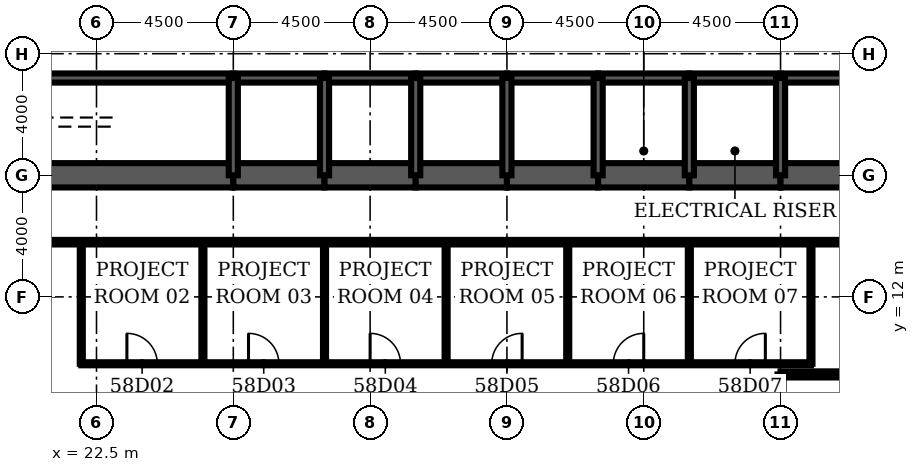
"""IFC4 building model, lengths in metres.
Left out: names, types, materials, properties, quantities, classifications, styles, units other than length and angle.
Written with IfcOpenShell. Run it as: python <this file> out.ifc"""

import sys

from ifc_helpers import new_model, si_unit, direction, frame, frame_2d, origin, place, context, subcontext, project, spatial, rectangle, extrude, element, fill, save


model = new_model("IFC4")
c1 = context("Model", 3, precision=1e-05, world=origin(), true_north=direction((0.0, 1.0)))
c2 = subcontext(c1, "Body", "Model", "MODEL_VIEW")
j1 = project(units=[si_unit("LENGTHUNIT", "METRE"), si_unit("PLANEANGLEUNIT", "RADIAN")], contexts=[c1])
p1 = place(None, origin())
s1 = spatial("IfcSite", under=j1, at=p1, CompositionType="ELEMENT")
p2 = place(p1, origin())
s2 = spatial("IfcBuilding", under=s1, at=p2, CompositionType="ELEMENT")
p3 = place(p2, frame((0.0, 0.0, 257.2)))
s3 = spatial("IfcBuildingStorey", under=s2, at=p3, CompositionType="ELEMENT", Elevation=257.2)
p4 = place(p3, frame((17.6, 16.0, 0.0), z_axis=(0.0, 0.0, 1.0), x_axis=(1.0, 0.0, 0.0)))
e1 = element("IfcWall", 1, at=p4, inside=s3, PredefinedType="SHEAR", context=c2, shape_type="SweptSolid", body=[
    extrude(rectangle(XDim=9.4, YDim=0.8, at=frame_2d((4.7, 0.0))), origin(), (0.0, 0.0, 1.0), 4.2),
])
for number, where, z_axis, x_axis in (
    (2, (27.0, 16.0, 0.0), (0.0, 0.0, 1.0), (1.0, 0.0, 0.0)),
    (3, (30.0, 16.0, 0.0), (0.0, 0.0, 1.0), (1.0, 0.0, 0.0)),
    (4, (33.0, 16.0, 0.0), (0.0, 0.0, 1.0), (1.0, 0.0, 0.0)),
    (5, (36.0, 16.0, 0.0), (0.0, 0.0, 1.0), (1.0, 0.0, 0.0)),
    (6, (39.0, 16.0, 0.0), (0.0, 0.0, 1.0), (1.0, 0.0, 0.0)),
    (7, (42.0, 16.0, 0.0), (0.0, 0.0, 1.0), (1.0, 0.0, 0.0)),
):
    element("IfcWall", number, at=place(p3, frame(where, z_axis=z_axis, x_axis=x_axis)), inside=s3, PredefinedType="SHEAR", context=c2, shape_type="SweptSolid", body=[
        extrude(rectangle(XDim=3.0, YDim=0.8, at=frame_2d((1.5, 0.0))), origin(), (0.0, 0.0, 1.0), 4.2),
    ])
p5 = place(p3, frame((45.0, 16.0, 0.0), z_axis=(0.0, 0.0, 1.0), x_axis=(1.0, 0.0, 0.0)))
e8 = element("IfcWall", 8, at=p5, inside=s3, PredefinedType="SHEAR", context=c2, shape_type="SweptSolid", body=[
    extrude(rectangle(XDim=9.4, YDim=0.8, at=frame_2d((4.7, 0.0))), origin(), (0.0, 0.0, 1.0), 4.2),
])
p6 = place(p3, frame((18.0, 19.2, 0.0), z_axis=(0.0, 0.0, 1.0), x_axis=(1.0, 0.0, 0.0)))
e9 = element("IfcWall", 9, at=p6, inside=s3, PredefinedType="SOLIDWALL", context=c2, shape_type="SweptSolid", body=[
    extrude(rectangle(XDim=9.0, YDim=0.3, at=frame_2d((4.5, 0.0))), origin(), (0.0, 0.0, 1.0), 4.2),
])
p7 = place(p6, frame((0.65, 0.0, 0.0)))
e10 = element("IfcOpeningElement", 10, at=p7, cuts=e9, PredefinedType="OPENING", context=c2, shape_type="SweptSolid", body=[
    extrude(rectangle(XDim=1.0, YDim=2.1, at=frame_2d((0.5, 1.05))), frame((0.0, 0.16, 0.0), z_axis=(0.0, -1.0, 0.0), x_axis=(1.0, 0.0, 0.0)), (0.0, 0.0, 1.0), 0.32),
])
p8 = place(p3, frame((27.0, 19.2, 0.0), z_axis=(0.0, 0.0, 1.0), x_axis=(1.0, 0.0, 0.0)))
e11 = element("IfcWall", 11, at=p8, inside=s3, PredefinedType="SOLIDWALL", context=c2, shape_type="SweptSolid", body=[
    extrude(rectangle(XDim=3.0, YDim=0.3, at=frame_2d((1.5, 0.0))), origin(), (0.0, 0.0, 1.0), 4.2),
])
p9 = place(p8, frame((0.95, 0.0, 0.0)))
e12 = element("IfcOpeningElement", 12, at=p9, cuts=e11, PredefinedType="OPENING", context=c2, shape_type="SweptSolid", body=[
    extrude(rectangle(XDim=1.1, YDim=2.2, at=frame_2d((0.55, 1.1))), frame((0.0, 0.16, 0.0), z_axis=(0.0, -1.0, 0.0), x_axis=(1.0, 0.0, 0.0)), (0.0, 0.0, 1.0), 0.32),
])
p10 = place(p3, frame((30.0, 19.2, 0.0), z_axis=(0.0, 0.0, 1.0), x_axis=(1.0, 0.0, 0.0)))
e13 = element("IfcWall", 13, at=p10, inside=s3, PredefinedType="SOLIDWALL", context=c2, shape_type="SweptSolid", body=[
    extrude(rectangle(XDim=3.0, YDim=0.3, at=frame_2d((1.5, 0.0))), origin(), (0.0, 0.0, 1.0), 4.2),
])
p11 = place(p10, frame((0.95, 0.0, 0.0)))
e14 = element("IfcOpeningElement", 14, at=p11, cuts=e13, PredefinedType="OPENING", context=c2, shape_type="SweptSolid", body=[
    extrude(rectangle(XDim=1.1, YDim=2.2, at=frame_2d((0.55, 1.1))), frame((0.0, 0.16, 0.0), z_axis=(0.0, -1.0, 0.0), x_axis=(1.0, 0.0, 0.0)), (0.0, 0.0, 1.0), 0.32),
])
p12 = place(p3, frame((33.0, 19.2, 0.0), z_axis=(0.0, 0.0, 1.0), x_axis=(1.0, 0.0, 0.0)))
e15 = element("IfcWall", 15, at=p12, inside=s3, PredefinedType="SOLIDWALL", context=c2, shape_type="SweptSolid", body=[
    extrude(rectangle(XDim=3.0, YDim=0.3, at=frame_2d((1.5, 0.0))), origin(), (0.0, 0.0, 1.0), 4.2),
])
p13 = place(p12, frame((0.95, 0.0, 0.0)))
e16 = element("IfcOpeningElement", 16, at=p13, cuts=e15, PredefinedType="OPENING", context=c2, shape_type="SweptSolid", body=[
    extrude(rectangle(XDim=1.1, YDim=2.2, at=frame_2d((0.55, 1.1))), frame((0.0, 0.16, 0.0), z_axis=(0.0, -1.0, 0.0), x_axis=(1.0, 0.0, 0.0)), (0.0, 0.0, 1.0), 0.32),
])
p14 = place(p3, frame((36.0, 19.2, 0.0), z_axis=(0.0, 0.0, 1.0), x_axis=(1.0, 0.0, 0.0)))
e17 = element("IfcWall", 17, at=p14, inside=s3, PredefinedType="SOLIDWALL", context=c2, shape_type="SweptSolid", body=[
    extrude(rectangle(XDim=3.0, YDim=0.3, at=frame_2d((1.5, 0.0))), origin(), (0.0, 0.0, 1.0), 4.2),
])
p15 = place(p14, frame((0.95, 0.0, 0.0)))
e18 = element("IfcOpeningElement", 18, at=p15, cuts=e17, PredefinedType="OPENING", context=c2, shape_type="SweptSolid", body=[
    extrude(rectangle(XDim=1.1, YDim=2.2, at=frame_2d((0.55, 1.1))), frame((0.0, 0.16, 0.0), z_axis=(0.0, -1.0, 0.0), x_axis=(1.0, 0.0, 0.0)), (0.0, 0.0, 1.0), 0.32),
])
p16 = place(p3, frame((39.0, 19.2, 0.0), z_axis=(0.0, 0.0, 1.0), x_axis=(1.0, 0.0, 0.0)))
e19 = element("IfcWall", 19, at=p16, inside=s3, PredefinedType="SOLIDWALL", context=c2, shape_type="SweptSolid", body=[
    extrude(rectangle(XDim=3.0, YDim=0.3, at=frame_2d((1.5, 0.0))), origin(), (0.0, 0.0, 1.0), 4.2),
])
p17 = place(p16, frame((1.0, 0.0, 0.0)))
e20 = element("IfcOpeningElement", 20, at=p17, cuts=e19, PredefinedType="OPENING", context=c2, shape_type="SweptSolid", body=[
    extrude(rectangle(XDim=1.0, YDim=2.1, at=frame_2d((0.5, 1.05))), frame((0.0, 0.16, 0.0), z_axis=(0.0, -1.0, 0.0), x_axis=(1.0, 0.0, 0.0)), (0.0, 0.0, 1.0), 0.32),
])
p18 = place(p3, frame((42.0, 19.2, 0.0), z_axis=(0.0, 0.0, 1.0), x_axis=(1.0, 0.0, 0.0)))
e21 = element("IfcWall", 21, at=p18, inside=s3, PredefinedType="SOLIDWALL", context=c2, shape_type="SweptSolid", body=[
    extrude(rectangle(XDim=3.0, YDim=0.3, at=frame_2d((1.5, 0.0))), origin(), (0.0, 0.0, 1.0), 4.2),
])
p19 = place(p18, frame((1.0, 0.0, 0.0)))
e22 = element("IfcOpeningElement", 22, at=p19, cuts=e21, PredefinedType="OPENING", context=c2, shape_type="SweptSolid", body=[
    extrude(rectangle(XDim=1.0, YDim=2.1, at=frame_2d((0.5, 1.05))), frame((0.0, 0.16, 0.0), z_axis=(0.0, -1.0, 0.0), x_axis=(1.0, 0.0, 0.0)), (0.0, 0.0, 1.0), 0.32),
])
p20 = place(p3, frame((45.0, 19.2, 0.0), z_axis=(0.0, 0.0, 1.0), x_axis=(1.0, 0.0, 0.0)))
e23 = element("IfcWall", 23, at=p20, inside=s3, PredefinedType="SOLIDWALL", context=c2, shape_type="SweptSolid", body=[
    extrude(rectangle(XDim=9.0, YDim=0.3, at=frame_2d((4.5, 0.0))), origin(), (0.0, 0.0, 1.0), 4.2),
])
p21 = place(p20, frame((7.35, 0.0, 0.0)))
e24 = element("IfcOpeningElement", 24, at=p21, cuts=e23, PredefinedType="OPENING", context=c2, shape_type="SweptSolid", body=[
    extrude(rectangle(XDim=1.0, YDim=2.1, at=frame_2d((0.5, 1.05))), frame((0.0, 0.16, 0.0), z_axis=(0.0, -1.0, 0.0), x_axis=(1.0, 0.0, 0.0)), (0.0, 0.0, 1.0), 0.32),
])
for number, where, z_axis, x_axis in (
    (25, (27.0, 16.0, 0.0), (0.0, 0.0, 1.0), (0.0, 1.0, 0.0)),
    (26, (30.0, 16.0, 0.0), (0.0, 0.0, 1.0), (0.0, 1.0, 0.0)),
    (27, (33.0, 16.0, 0.0), (0.0, 0.0, 1.0), (0.0, 1.0, 0.0)),
    (28, (36.0, 16.0, 0.0), (0.0, 0.0, 1.0), (0.0, 1.0, 0.0)),
    (29, (39.0, 16.0, 0.0), (0.0, 0.0, 1.0), (0.0, 1.0, 0.0)),
    (30, (42.0, 16.0, 0.0), (0.0, 0.0, 1.0), (0.0, 1.0, 0.0)),
    (31, (45.0, 16.0, 0.0), (0.0, 0.0, 1.0), (0.0, 1.0, 0.0)),
):
    element("IfcWall", number, at=place(p3, frame(where, z_axis=z_axis, x_axis=x_axis)), inside=s3, PredefinedType="SOLIDWALL", context=c2, shape_type="SweptSolid", body=[
        extrude(rectangle(XDim=3.2, YDim=0.3, at=frame_2d((1.6, 0.0))), origin(), (0.0, 0.0, 1.0), 4.2),
    ])
p22 = place(p3, frame((39.15, 17.35, 0.0), z_axis=(0.0, 0.0, 1.0), x_axis=(1.0, 0.0, 0.0)))
e32 = element("IfcWall", 32, at=p22, inside=s3, PredefinedType="SOLIDWALL", context=c2, shape_type="SweptSolid", body=[
    extrude(rectangle(XDim=2.7, YDim=0.3, at=frame_2d((1.35, 0.0))), origin(), (0.0, 0.0, 1.0), 4.04),
])
p23 = place(p22, frame((0.85, 0.0, 0.0)))
e33 = element("IfcOpeningElement", 33, at=p23, cuts=e32, PredefinedType="OPENING", context=c2, shape_type="SweptSolid", body=[
    extrude(rectangle(XDim=1.0, YDim=2.1, at=frame_2d((0.5, 1.05))), frame((0.0, 0.16, 0.0), z_axis=(0.0, -1.0, 0.0), x_axis=(1.0, 0.0, 0.0)), (0.0, 0.0, 1.0), 0.32),
])
p24 = place(p3, frame((42.15, 17.35, 0.0), z_axis=(0.0, 0.0, 1.0), x_axis=(1.0, 0.0, 0.0)))
e34 = element("IfcWall", 34, at=p24, inside=s3, PredefinedType="SOLIDWALL", context=c2, shape_type="SweptSolid", body=[
    extrude(rectangle(XDim=2.7, YDim=0.3, at=frame_2d((1.35, 0.0))), origin(), (0.0, 0.0, 1.0), 4.04),
])
p25 = place(p24, frame((0.85, 0.0, 0.0)))
e35 = element("IfcOpeningElement", 35, at=p25, cuts=e34, PredefinedType="OPENING", context=c2, shape_type="SweptSolid", body=[
    extrude(rectangle(XDim=1.0, YDim=2.1, at=frame_2d((0.5, 1.05))), frame((0.0, 0.16, 0.0), z_axis=(0.0, -1.0, 0.0), x_axis=(1.0, 0.0, 0.0)), (0.0, 0.0, 1.0), 0.32),
])
p26 = place(p3, frame((45.0, 9.45, 0.0), z_axis=(0.0, 0.0, 1.0), x_axis=(1.0, 0.0, 0.0)))
e36 = element("IfcWall", 36, at=p26, inside=s3, PredefinedType="PARTITIONING", context=c2, shape_type="SweptSolid", body=[
    extrude(rectangle(XDim=18.0, YDim=0.2, at=frame_2d((9.0, 0.0))), origin(), (0.0, 0.0, 1.0), 3.0),
])
p27 = place(p26, frame((8.2, 0.0, 0.0)))
e37 = element("IfcOpeningElement", 37, at=p27, cuts=e36, PredefinedType="OPENING", context=c2, shape_type="SweptSolid", body=[
    extrude(rectangle(XDim=1.6, YDim=2.1, at=frame_2d((0.8, 1.05))), frame((0.0, 0.11, 0.0), z_axis=(0.0, -1.0, 0.0), x_axis=(1.0, 0.0, 0.0)), (0.0, 0.0, 1.0), 0.22),
])
p28 = place(p3, frame((22.0, 9.8, 0.0), z_axis=(0.0, 0.0, 1.0), x_axis=(1.0, 0.0, 0.0)))
e38 = element("IfcWall", 38, at=p28, inside=s3, PredefinedType="PARTITIONING", context=c2, shape_type="SweptSolid", body=[
    extrude(rectangle(XDim=24.0, YDim=0.1, at=frame_2d((12.0, 0.0))), origin(), (0.0, 0.0, 1.0), 3.0),
])
p29 = place(p28, frame((1.5, 0.0, 0.0)))
e39 = element("IfcOpeningElement", 39, at=p29, cuts=e38, PredefinedType="OPENING", context=c2, shape_type="SweptSolid", body=[
    extrude(rectangle(XDim=1.0, YDim=2.1, at=frame_2d((0.5, 1.05))), frame((0.0, 0.06, 0.0), z_axis=(0.0, -1.0, 0.0), x_axis=(1.0, 0.0, 0.0)), (0.0, 0.0, 1.0), 0.12),
])
p30 = place(p28, frame((5.5, 0.0, 0.0)))
e40 = element("IfcOpeningElement", 40, at=p30, cuts=e38, PredefinedType="OPENING", context=c2, shape_type="SweptSolid", body=[
    extrude(rectangle(XDim=1.0, YDim=2.1, at=frame_2d((0.5, 1.05))), frame((0.0, 0.06, 0.0), z_axis=(0.0, -1.0, 0.0), x_axis=(1.0, 0.0, 0.0)), (0.0, 0.0, 1.0), 0.12),
])
p31 = place(p28, frame((9.5, 0.0, 0.0)))
e41 = element("IfcOpeningElement", 41, at=p31, cuts=e38, PredefinedType="OPENING", context=c2, shape_type="SweptSolid", body=[
    extrude(rectangle(XDim=1.0, YDim=2.1, at=frame_2d((0.5, 1.05))), frame((0.0, 0.06, 0.0), z_axis=(0.0, -1.0, 0.0), x_axis=(1.0, 0.0, 0.0)), (0.0, 0.0, 1.0), 0.12),
])
p32 = place(p28, frame((13.5, 0.0, 0.0)))
e42 = element("IfcOpeningElement", 42, at=p32, cuts=e38, PredefinedType="OPENING", context=c2, shape_type="SweptSolid", body=[
    extrude(rectangle(XDim=1.0, YDim=2.1, at=frame_2d((0.5, 1.05))), frame((0.0, 0.06, 0.0), z_axis=(0.0, -1.0, 0.0), x_axis=(1.0, 0.0, 0.0)), (0.0, 0.0, 1.0), 0.12),
])
p33 = place(p28, frame((17.5, 0.0, 0.0)))
e43 = element("IfcOpeningElement", 43, at=p33, cuts=e38, PredefinedType="OPENING", context=c2, shape_type="SweptSolid", body=[
    extrude(rectangle(XDim=1.0, YDim=2.1, at=frame_2d((0.5, 1.05))), frame((0.0, 0.06, 0.0), z_axis=(0.0, -1.0, 0.0), x_axis=(1.0, 0.0, 0.0)), (0.0, 0.0, 1.0), 0.12),
])
p34 = place(p28, frame((21.5, 0.0, 0.0)))
e44 = element("IfcOpeningElement", 44, at=p34, cuts=e38, PredefinedType="OPENING", context=c2, shape_type="SweptSolid", body=[
    extrude(rectangle(XDim=1.0, YDim=2.1, at=frame_2d((0.5, 1.05))), frame((0.0, 0.06, 0.0), z_axis=(0.0, -1.0, 0.0), x_axis=(1.0, 0.0, 0.0)), (0.0, 0.0, 1.0), 0.12),
])
p35 = place(p3, frame((15.2, 13.8, 0.0), z_axis=(0.0, 0.0, 1.0), x_axis=(1.0, 0.0, 0.0)))
e45 = element("IfcWall", 45, at=p35, inside=s3, PredefinedType="PARTITIONING", context=c2, shape_type="SweptSolid", body=[
    extrude(rectangle(XDim=41.6, YDim=0.15, at=frame_2d((20.8, 0.0))), origin(), (0.0, 0.0, 1.0), 3.0),
])
p36 = place(p35, frame((4.175, 0.0, 0.0)))
e46 = element("IfcOpeningElement", 46, at=p36, cuts=e45, PredefinedType="OPENING", context=c2, shape_type="SweptSolid", body=[
    extrude(rectangle(XDim=1.2, YDim=2.1, at=frame_2d((0.6, 1.05))), frame((0.0, 0.085, 0.0), z_axis=(0.0, -1.0, 0.0), x_axis=(1.0, 0.0, 0.0)), (0.0, 0.0, 1.0), 0.17),
])
for number, where, z_axis, x_axis in (
    (47, (22.0, 9.8, 0.0), (0.0, 0.0, 1.0), (0.0, 1.0, 0.0)),
    (48, (26.0, 9.8, 0.0), (0.0, 0.0, 1.0), (0.0, 1.0, 0.0)),
    (49, (30.0, 9.8, 0.0), (0.0, 0.0, 1.0), (0.0, 1.0, 0.0)),
    (50, (34.0, 9.8, 0.0), (0.0, 0.0, 1.0), (0.0, 1.0, 0.0)),
    (51, (38.0, 9.8, 0.0), (0.0, 0.0, 1.0), (0.0, 1.0, 0.0)),
    (52, (42.0, 9.8, 0.0), (0.0, 0.0, 1.0), (0.0, 1.0, 0.0)),
):
    element("IfcWall", number, at=place(p3, frame(where, z_axis=z_axis, x_axis=x_axis)), inside=s3, PredefinedType="PARTITIONING", context=c2, shape_type="SweptSolid", body=[
        extrude(rectangle(XDim=4.0, YDim=0.1, at=frame_2d((2.0, 0.0))), origin(), (0.0, 0.0, 1.0), 3.0),
    ])
p37 = place(p3, frame((45.0, 2.45, 0.0), z_axis=(0.0, 0.0, 1.0), x_axis=(0.0, 1.0, 0.0)))
e53 = element("IfcWall", 53, at=p37, inside=s3, PredefinedType="PARTITIONING", context=c2, shape_type="SweptSolid", body=[
    extrude(rectangle(XDim=7.0, YDim=0.2, at=frame_2d((3.5, 0.0))), origin(), (0.0, 0.0, 1.0), 3.0),
])
p38 = place(p3, frame((46.0, 9.8, 0.0), z_axis=(0.0, 0.0, 1.0), x_axis=(0.0, 1.0, 0.0)))
e54 = element("IfcWall", 54, at=p38, inside=s3, PredefinedType="PARTITIONING", context=c2, shape_type="SweptSolid", body=[
    extrude(rectangle(XDim=4.0, YDim=0.1, at=frame_2d((2.0, 0.0))), origin(), (0.0, 0.0, 1.0), 3.0),
])
p39 = place(p23, origin())
e55 = element("IfcDoor", 55, at=p39, inside=s3, OperationType="SINGLE_SWING_LEFT", PredefinedType="DOOR", context=c2, shape_type="SweptSolid", body=[
    extrude(rectangle(XDim=1.0, YDim=2.1, at=frame_2d((0.5, 1.05))), frame((0.0, 0.025, 0.0), z_axis=(0.0, -1.0, 0.0), x_axis=(1.0, 0.0, 0.0)), (0.0, 0.0, 1.0), 0.05),
])
fill(e33, e55)
p40 = place(p25, origin())
e56 = element("IfcDoor", 56, at=p40, inside=s3, OperationType="SINGLE_SWING_LEFT", PredefinedType="DOOR", context=c2, shape_type="SweptSolid", body=[
    extrude(rectangle(XDim=1.0, YDim=2.1, at=frame_2d((0.5, 1.05))), frame((0.0, 0.025, 0.0), z_axis=(0.0, -1.0, 0.0), x_axis=(1.0, 0.0, 0.0)), (0.0, 0.0, 1.0), 0.05),
])
fill(e35, e56)
p41 = place(p29, origin())
e57 = element("IfcDoor", 57, at=p41, inside=s3, OperationType="SINGLE_SWING_LEFT", PredefinedType="DOOR", context=c2, shape_type="SweptSolid", body=[
    extrude(rectangle(XDim=1.0, YDim=2.1, at=frame_2d((0.5, 1.05))), frame((0.0, 0.025, 0.0), z_axis=(0.0, -1.0, 0.0), x_axis=(1.0, 0.0, 0.0)), (0.0, 0.0, 1.0), 0.05),
])
fill(e39, e57)
p42 = place(p30, origin())
e58 = element("IfcDoor", 58, at=p42, inside=s3, OperationType="SINGLE_SWING_LEFT", PredefinedType="DOOR", context=c2, shape_type="SweptSolid", body=[
    extrude(rectangle(XDim=1.0, YDim=2.1, at=frame_2d((0.5, 1.05))), frame((0.0, 0.025, 0.0), z_axis=(0.0, -1.0, 0.0), x_axis=(1.0, 0.0, 0.0)), (0.0, 0.0, 1.0), 0.05),
])
fill(e40, e58)
p43 = place(p31, origin())
e59 = element("IfcDoor", 59, at=p43, inside=s3, OperationType="SINGLE_SWING_LEFT", PredefinedType="DOOR", context=c2, shape_type="SweptSolid", body=[
    extrude(rectangle(XDim=1.0, YDim=2.1, at=frame_2d((0.5, 1.05))), frame((0.0, 0.025, 0.0), z_axis=(0.0, -1.0, 0.0), x_axis=(1.0, 0.0, 0.0)), (0.0, 0.0, 1.0), 0.05),
])
fill(e41, e59)
p44 = place(p32, origin())
e60 = element("IfcDoor", 60, at=p44, inside=s3, OperationType="SINGLE_SWING_RIGHT", PredefinedType="DOOR", context=c2, shape_type="SweptSolid", body=[
    extrude(rectangle(XDim=1.0, YDim=2.1, at=frame_2d((0.5, 1.05))), frame((0.0, 0.025, 0.0), z_axis=(0.0, -1.0, 0.0), x_axis=(1.0, 0.0, 0.0)), (0.0, 0.0, 1.0), 0.05),
])
fill(e42, e60)
p45 = place(p33, origin())
e61 = element("IfcDoor", 61, at=p45, inside=s3, OperationType="SINGLE_SWING_RIGHT", PredefinedType="DOOR", context=c2, shape_type="SweptSolid", body=[
    extrude(rectangle(XDim=1.0, YDim=2.1, at=frame_2d((0.5, 1.05))), frame((0.0, 0.025, 0.0), z_axis=(0.0, -1.0, 0.0), x_axis=(1.0, 0.0, 0.0)), (0.0, 0.0, 1.0), 0.05),
])
fill(e43, e61)
p46 = place(p34, origin())
e62 = element("IfcDoor", 62, at=p46, inside=s3, OperationType="SINGLE_SWING_RIGHT", PredefinedType="DOOR", context=c2, shape_type="SweptSolid", body=[
    extrude(rectangle(XDim=1.0, YDim=2.1, at=frame_2d((0.5, 1.05))), frame((0.0, 0.025, 0.0), z_axis=(0.0, -1.0, 0.0), x_axis=(1.0, 0.0, 0.0)), (0.0, 0.0, 1.0), 0.05),
])
fill(e44, e62)
p47 = place(p9, origin())
e63 = element("IfcDoor", 63, at=p47, inside=s3, OperationType="DOUBLE_DOOR_SLIDING", PredefinedType="USERDEFINED", context=c2, shape_type="SweptSolid", body=[
    extrude(rectangle(XDim=1.1, YDim=2.2, at=frame_2d((0.55, 1.1))), frame((0.0, 0.025, 0.0), z_axis=(0.0, -1.0, 0.0), x_axis=(1.0, 0.0, 0.0)), (0.0, 0.0, 1.0), 0.05),
])
fill(e12, e63)
p48 = place(p11, origin())
e64 = element("IfcDoor", 64, at=p48, inside=s3, OperationType="DOUBLE_DOOR_SLIDING", PredefinedType="USERDEFINED", context=c2, shape_type="SweptSolid", body=[
    extrude(rectangle(XDim=1.1, YDim=2.2, at=frame_2d((0.55, 1.1))), frame((0.0, 0.025, 0.0), z_axis=(0.0, -1.0, 0.0), x_axis=(1.0, 0.0, 0.0)), (0.0, 0.0, 1.0), 0.05),
])
fill(e14, e64)
p49 = place(p13, origin())
e65 = element("IfcDoor", 65, at=p49, inside=s3, OperationType="DOUBLE_DOOR_SLIDING", PredefinedType="USERDEFINED", context=c2, shape_type="SweptSolid", body=[
    extrude(rectangle(XDim=1.1, YDim=2.2, at=frame_2d((0.55, 1.1))), frame((0.0, 0.025, 0.0), z_axis=(0.0, -1.0, 0.0), x_axis=(1.0, 0.0, 0.0)), (0.0, 0.0, 1.0), 0.05),
])
fill(e16, e65)
p50 = place(p15, origin())
e66 = element("IfcDoor", 66, at=p50, inside=s3, OperationType="DOUBLE_DOOR_SLIDING", PredefinedType="USERDEFINED", context=c2, shape_type="SweptSolid", body=[
    extrude(rectangle(XDim=1.1, YDim=2.2, at=frame_2d((0.55, 1.1))), frame((0.0, 0.025, 0.0), z_axis=(0.0, -1.0, 0.0), x_axis=(1.0, 0.0, 0.0)), (0.0, 0.0, 1.0), 0.05),
])
fill(e18, e66)
p51 = place(p17, origin())
e67 = element("IfcDoor", 67, at=p51, inside=s3, OperationType="SINGLE_SWING_LEFT", PredefinedType="DOOR", context=c2, shape_type="SweptSolid", body=[
    extrude(rectangle(XDim=1.0, YDim=2.1, at=frame_2d((0.5, 1.05))), frame((0.0, 0.025, 0.0), z_axis=(0.0, -1.0, 0.0), x_axis=(1.0, 0.0, 0.0)), (0.0, 0.0, 1.0), 0.05),
])
fill(e20, e67)
p52 = place(p19, origin())
e68 = element("IfcDoor", 68, at=p52, inside=s3, OperationType="SINGLE_SWING_LEFT", PredefinedType="DOOR", context=c2, shape_type="SweptSolid", body=[
    extrude(rectangle(XDim=1.0, YDim=2.1, at=frame_2d((0.5, 1.05))), frame((0.0, 0.025, 0.0), z_axis=(0.0, -1.0, 0.0), x_axis=(1.0, 0.0, 0.0)), (0.0, 0.0, 1.0), 0.05),
])
fill(e22, e68)
save(model, sys.argv[1])
